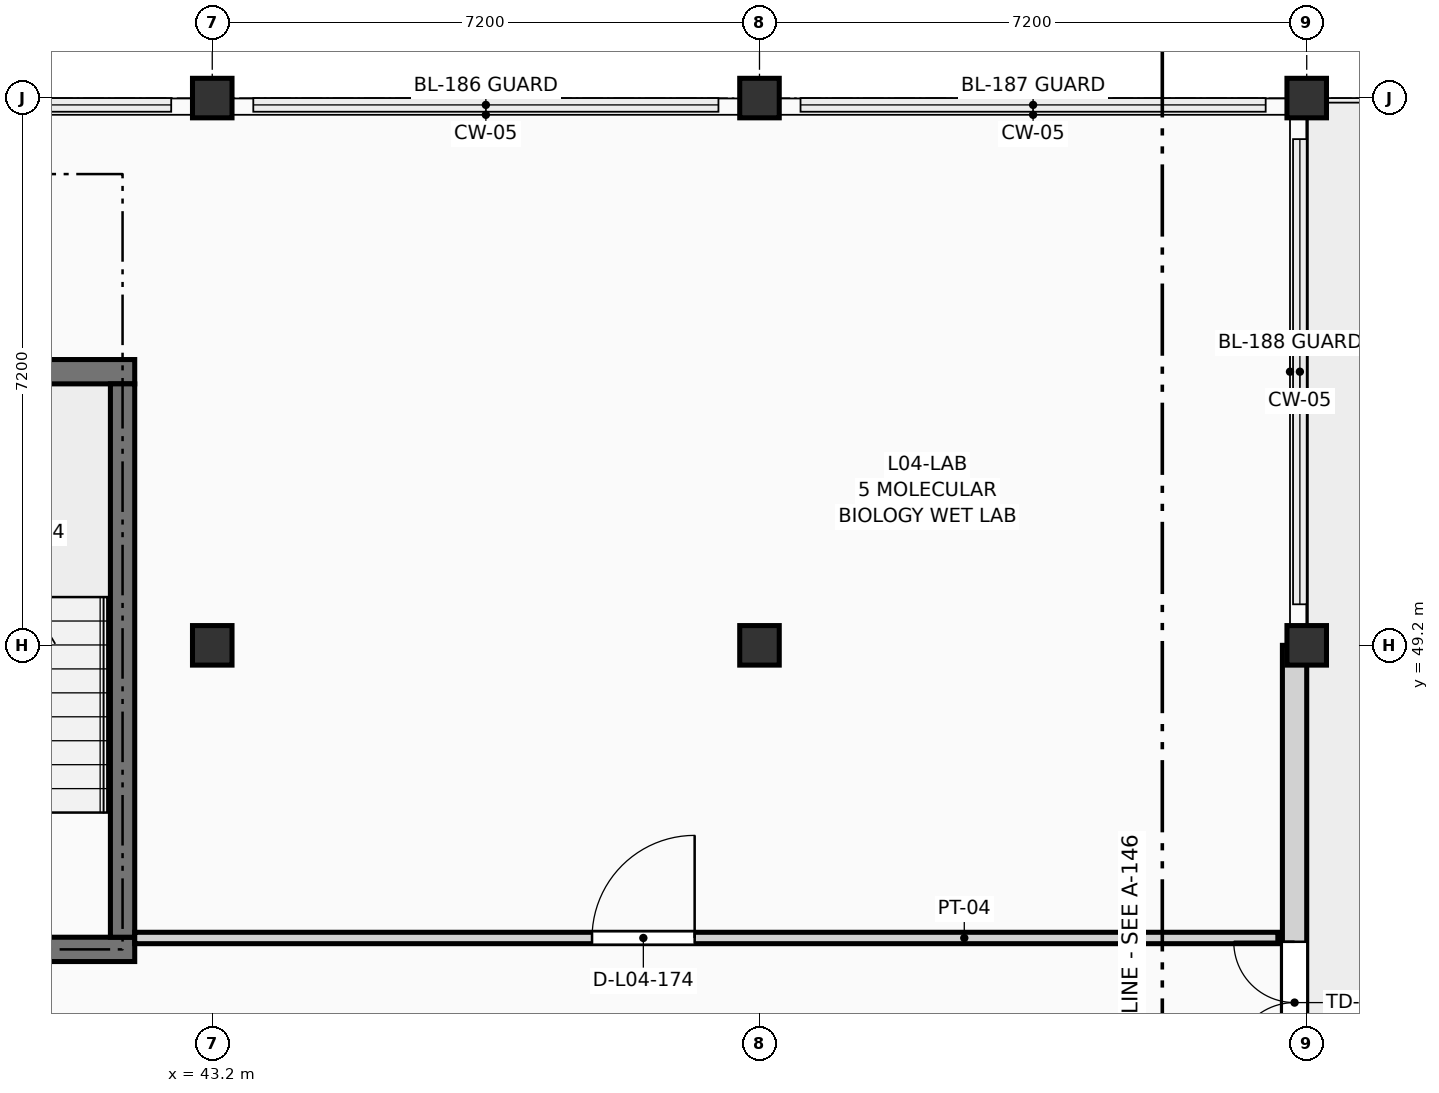
"""IFC4 building model, lengths in metres.
Left out: names, types, materials, properties, quantities, classifications, styles, units other than length and angle.
Written with IfcOpenShell. Run it as: python <this file> out.ifc"""

import sys

from ifc_helpers import new_model, si_unit, direction, frame, frame_2d, origin, origin_2d, place, context, subcontext, project, spatial, rectangle, extrude, element, fill, save


model = new_model("IFC4")
c1 = context("Model", 3, precision=1e-05, world=origin(), true_north=direction((0.0, 1.0)))
c2 = subcontext(c1, "Body", "Model", "MODEL_VIEW")
j1 = project(units=[si_unit("LENGTHUNIT", "METRE"), si_unit("PLANEANGLEUNIT", "RADIAN")], contexts=[c1])
p1 = place(None, origin())
s1 = spatial("IfcSite", under=j1, at=p1, CompositionType="ELEMENT")
p2 = place(p1, origin())
s2 = spatial("IfcBuilding", under=s1, at=p2, CompositionType="ELEMENT")
p3 = place(p2, frame((0.0, 0.0, 15.75)))
s3 = spatial("IfcBuildingStorey", under=s2, at=p3, CompositionType="ELEMENT", Elevation=15.75)
for number, where, z_axis, x_axis in (
    (1, (43.2, 49.2, 0.0), (0.0, 0.0, 1.0), (1.0, 0.0, 0.0)),
    (2, (43.2, 56.4, 0.0), (0.0, 0.0, 1.0), (1.0, 0.0, 0.0)),
    (3, (50.4, 49.2, 0.0), (0.0, 0.0, 1.0), (1.0, 0.0, 0.0)),
    (4, (50.4, 56.4, 0.0), (0.0, 0.0, 1.0), (1.0, 0.0, 0.0)),
    (5, (57.6, 49.2, 0.0), (0.0, 0.0, 1.0), (1.0, 0.0, 0.0)),
    (6, (57.6, 56.4, 0.0), (0.0, 0.0, 1.0), (1.0, 0.0, 0.0)),
):
    element("IfcColumn", number, at=place(p3, frame(where, z_axis=z_axis, x_axis=x_axis)), inside=s3, PredefinedType="COLUMN", context=c2, shape_type="SweptSolid", body=[
        extrude(rectangle(XDim=0.52, YDim=0.52, at=origin_2d()), origin(), (0.0, 0.0, 1.0), 3.6),
    ])
p4 = place(p3, frame((57.44, 43.2, 0.0), z_axis=(0.0, 0.0, 1.0), x_axis=(0.0, 1.0, 0.0)))
e7 = element("IfcWall", 7, at=p4, inside=s3, PredefinedType="SOLIDWALL", context=c2, shape_type="SweptSolid", body=[
    extrude(rectangle(XDim=6.0, YDim=0.32, at=frame_2d((3.0, 0.0))), origin(), (0.0, 0.0, 1.0), 2.84),
])
p5 = place(p4, frame((0.5, 0.0, 0.0)))
e8 = element("IfcOpeningElement", 8, at=p5, cuts=e7, PredefinedType="OPENING", context=c2, shape_type="SweptSolid", body=[
    extrude(rectangle(XDim=1.6, YDim=2.25, at=frame_2d((0.8, 1.125))), frame((0.0, 0.172, 0.0), z_axis=(0.0, -1.0, 0.0), x_axis=(1.0, 0.0, 0.0)), (0.0, 0.0, 1.0), 0.344),
])
for number, where, z_axis, x_axis in (
    (9, (37.74, 45.2, 0.0), (0.0, 0.0, 1.0), (1.0, 0.0, 0.0)),
    (10, (37.74, 52.8, 0.0), (0.0, 0.0, 1.0), (1.0, 0.0, 0.0)),
):
    element("IfcWall", number, at=place(p3, frame(where, z_axis=z_axis, x_axis=x_axis)), inside=s3, PredefinedType="SHEAR", context=c2, shape_type="SweptSolid", body=[
        extrude(rectangle(XDim=4.44, YDim=0.32, at=frame_2d((2.22, 0.0))), origin(), (0.0, 0.0, 1.0), 3.39),
    ])
p6 = place(p3, frame((42.02, 45.36, 0.0), z_axis=(0.0, 0.0, 1.0), x_axis=(0.0, 1.0, 0.0)))
e11 = element("IfcWall", 11, at=p6, inside=s3, PredefinedType="SHEAR", context=c2, shape_type="SweptSolid", body=[
    extrude(rectangle(XDim=7.28, YDim=0.32, at=frame_2d((3.64, 0.0))), origin(), (0.0, 0.0, 1.0), 3.39),
])
p7 = place(p3, frame((42.18, 45.35, 0.0), z_axis=(0.0, 0.0, 1.0), x_axis=(1.0, 0.0, 0.0)))
e12 = element("IfcWall", 12, at=p7, inside=s3, PredefinedType="PARTITIONING", context=c2, shape_type="SweptSolid", body=[
    extrude(rectangle(XDim=15.04, YDim=0.15, at=frame_2d((7.52, 0.0))), origin(), (0.0, 0.0, 1.0), 3.375),
])
p8 = place(p7, frame((6.017, 0.0, 0.0)))
e13 = element("IfcOpeningElement", 13, at=p8, cuts=e12, PredefinedType="OPENING", context=c2, shape_type="SweptSolid", body=[
    extrude(rectangle(XDim=1.35, YDim=2.2, at=frame_2d((0.675, 1.1))), frame((0.0, 0.087, 0.0), z_axis=(0.0, -1.0, 0.0), x_axis=(1.0, 0.0, 0.0)), (0.0, 0.0, 1.0), 0.174),
])
p9 = place(p5, origin())
e14 = element("IfcDoor", 14, at=p9, inside=s3, OperationType="DOUBLE_DOOR_SINGLE_SWING", PredefinedType="DOOR", context=c2, shape_type="SweptSolid", body=[
    extrude(rectangle(XDim=1.6, YDim=2.25, at=frame_2d((0.8, 1.125))), frame((0.0, 0.025, 0.0), z_axis=(0.0, -1.0, 0.0), x_axis=(1.0, 0.0, 0.0)), (0.0, 0.0, 1.0), 0.05),
])
fill(e8, e14)
p10 = place(p8, origin())
e15 = element("IfcDoor", 15, at=p10, inside=s3, OperationType="SINGLE_SWING_RIGHT", PredefinedType="DOOR", context=c2, shape_type="SweptSolid", body=[
    extrude(rectangle(XDim=1.35, YDim=2.2, at=frame_2d((0.675, 1.1))), frame((0.0, 0.025, 0.0), z_axis=(0.0, -1.0, 0.0), x_axis=(1.0, 0.0, 0.0)), (0.0, 0.0, 1.0), 0.05),
])
fill(e13, e15)
save(model, sys.argv[1])
